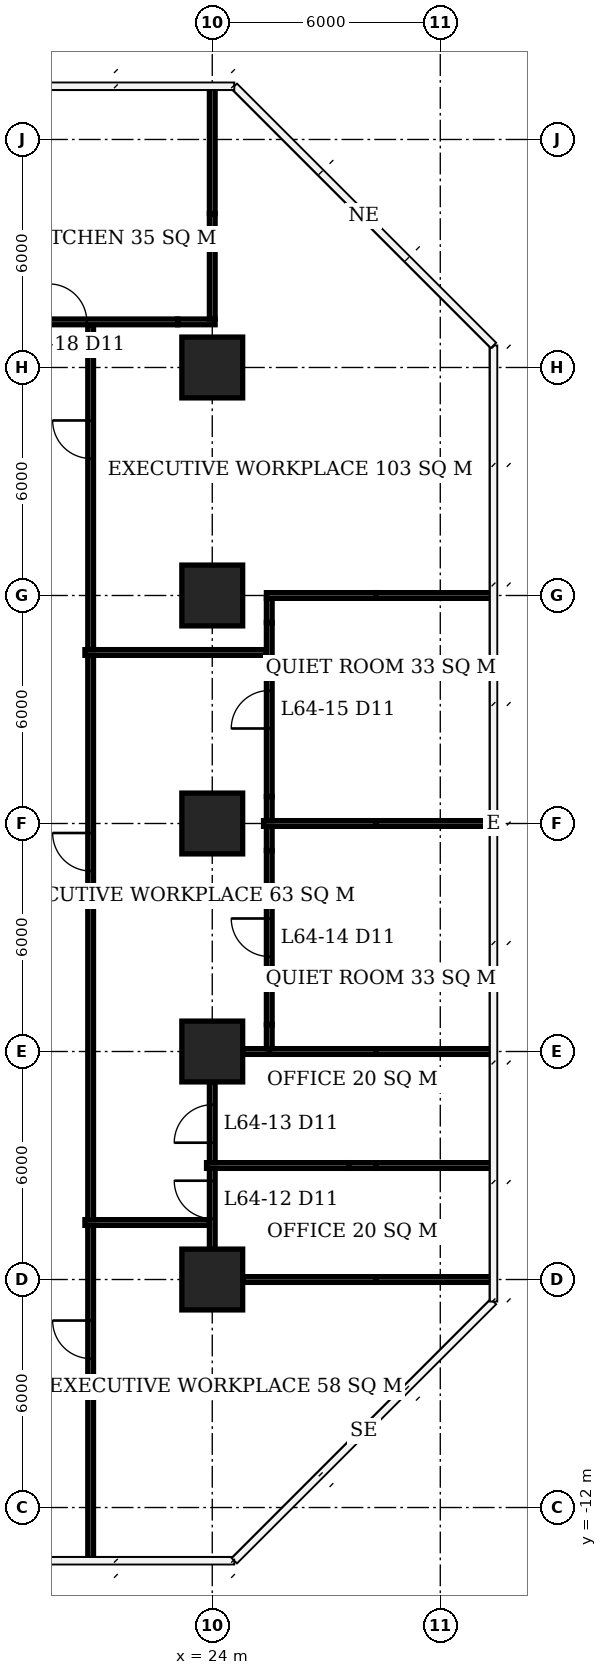
"""IFC4 building model, lengths in metres.
Left out: names, types, materials, properties, quantities, classifications, styles, units other than length and angle.
Written with IfcOpenShell. Run it as: python <this file> out.ifc"""

import sys

from ifc_helpers import new_model, si_unit, direction, frame, frame_2d, origin, origin_2d, place, context, subcontext, project, spatial, rectangle, extrude, element, fill, save


model = new_model("IFC4")
c1 = context("Model", 3, precision=1e-05, world=origin(), true_north=direction((0.0, 1.0)))
c2 = subcontext(c1, "Body", "Model", "MODEL_VIEW")
j1 = project(units=[si_unit("LENGTHUNIT", "METRE"), si_unit("PLANEANGLEUNIT", "RADIAN")], contexts=[c1])
p1 = place(None, origin())
s1 = spatial("IfcSite", under=j1, at=p1, CompositionType="ELEMENT")
p2 = place(p1, origin())
s2 = spatial("IfcBuilding", under=s1, at=p2, CompositionType="ELEMENT")
p3 = place(p2, frame((0.0, 0.0, 260.6)))
s3 = spatial("IfcBuildingStorey", under=s2, at=p3, CompositionType="ELEMENT", Elevation=260.6)
for number, where, z_axis, x_axis in (
    (1, (24.0, -6.0, 0.0), (0.0, 0.0, 1.0), (1.0, 0.0, 0.0)),
    (2, (24.0, 0.0, 0.0), (0.0, 0.0, 1.0), (1.0, 0.0, 0.0)),
    (3, (24.0, 6.0, 0.0), (0.0, 0.0, 1.0), (1.0, 0.0, 0.0)),
    (4, (24.0, 12.0, 0.0), (0.0, 0.0, 1.0), (1.0, 0.0, 0.0)),
    (5, (24.0, 18.0, 0.0), (0.0, 0.0, 1.0), (1.0, 0.0, 0.0)),
):
    element("IfcColumn", number, at=place(p3, frame(where, z_axis=z_axis, x_axis=x_axis)), inside=s3, PredefinedType="COLUMN", context=c2, shape_type="SweptSolid", body=[
        extrude(rectangle(XDim=1.6, YDim=1.6, at=origin_2d()), origin(), (0.0, 0.0, 1.0), 3.9),
    ])
p4 = place(p3, frame((24.8, -6.0, 0.0), z_axis=(0.0, 0.0, 1.0), x_axis=(1.0, 0.0, 0.0)))
e6 = element("IfcWall", 6, at=p4, inside=s3, PredefinedType="PARTITIONING", context=c2, shape_type="SweptSolid", body=[
    extrude(rectangle(XDim=3.51, YDim=0.15, at=frame_2d((1.755, 0.0))), origin(), (0.0, 0.0, 1.0), 2.65),
])
p5 = place(p3, frame((28.31, -6.0, 0.0), z_axis=(0.0, 0.0, 1.0), x_axis=(1.0, 0.0, 0.0)))
e7 = element("IfcWall", 7, at=p5, inside=s3, PredefinedType="PARTITIONING", context=c2, shape_type="SweptSolid", body=[
    extrude(rectangle(XDim=3.065, YDim=0.15, at=frame_2d((1.532, 0.0))), origin(), (0.0, 0.0, 1.0), 3.65),
])
p6 = place(p3, frame((23.85, -3.0, 0.0), z_axis=(0.0, 0.0, 1.0), x_axis=(1.0, 0.0, 0.0)))
e8 = element("IfcWall", 8, at=p6, inside=s3, PredefinedType="PARTITIONING", context=c2, shape_type="SweptSolid", body=[
    extrude(rectangle(XDim=3.74, YDim=0.15, at=frame_2d((1.87, 0.0))), origin(), (0.0, 0.0, 1.0), 3.65),
])
p7 = place(p3, frame((27.59, -3.0, 0.0), z_axis=(0.0, 0.0, 1.0), x_axis=(1.0, 0.0, 0.0)))
e9 = element("IfcWall", 9, at=p7, inside=s3, PredefinedType="PARTITIONING", context=c2, shape_type="SweptSolid", body=[
    extrude(rectangle(XDim=0.72, YDim=0.15, at=frame_2d((0.36, 0.0))), origin(), (0.0, 0.0, 1.0), 2.65),
])
p8 = place(p3, frame((28.31, -3.0, 0.0), z_axis=(0.0, 0.0, 1.0), x_axis=(1.0, 0.0, 0.0)))
e10 = element("IfcWall", 10, at=p8, inside=s3, PredefinedType="PARTITIONING", context=c2, shape_type="SweptSolid", body=[
    extrude(rectangle(XDim=3.065, YDim=0.15, at=frame_2d((1.532, 0.0))), origin(), (0.0, 0.0, 1.0), 3.65),
])
p9 = place(p3, frame((24.8, 0.0, 0.0), z_axis=(0.0, 0.0, 1.0), x_axis=(1.0, 0.0, 0.0)))
e11 = element("IfcWall", 11, at=p9, inside=s3, PredefinedType="PARTITIONING", context=c2, shape_type="SweptSolid", body=[
    extrude(rectangle(XDim=0.775, YDim=0.15, at=frame_2d((0.387, 0.0))), origin(), (0.0, 0.0, 1.0), 2.65),
])
p10 = place(p3, frame((25.5, 0.0, 0.0), z_axis=(0.0, 0.0, 1.0), x_axis=(1.0, 0.0, 0.0)))
e12 = element("IfcWall", 12, at=p10, inside=s3, PredefinedType="PARTITIONING", context=c2, shape_type="SweptSolid", body=[
    extrude(rectangle(XDim=2.81, YDim=0.15, at=frame_2d((1.405, 0.0))), origin(), (0.0, 0.0, 1.0), 2.65),
])
p11 = place(p3, frame((28.31, 0.0, 0.0), z_axis=(0.0, 0.0, 1.0), x_axis=(1.0, 0.0, 0.0)))
e13 = element("IfcWall", 13, at=p11, inside=s3, PredefinedType="PARTITIONING", context=c2, shape_type="SweptSolid", body=[
    extrude(rectangle(XDim=3.065, YDim=0.15, at=frame_2d((1.532, 0.0))), origin(), (0.0, 0.0, 1.0), 3.65),
])
p12 = place(p3, frame((25.35, 6.0, 0.0), z_axis=(0.0, 0.0, 1.0), x_axis=(1.0, 0.0, 0.0)))
e14 = element("IfcWall", 14, at=p12, inside=s3, PredefinedType="PARTITIONING", context=c2, shape_type="SweptSolid", body=[
    extrude(rectangle(XDim=2.96, YDim=0.15, at=frame_2d((1.48, 0.0))), origin(), (0.0, 0.0, 1.0), 2.65),
])
p13 = place(p3, frame((28.31, 6.0, 0.0), z_axis=(0.0, 0.0, 1.0), x_axis=(1.0, 0.0, 0.0)))
e15 = element("IfcWall", 15, at=p13, inside=s3, PredefinedType="PARTITIONING", context=c2, shape_type="SweptSolid", body=[
    extrude(rectangle(XDim=3.04, YDim=0.15, at=frame_2d((1.52, 0.0))), origin(), (0.0, 0.0, 1.0), 3.65),
])
p14 = place(p3, frame((25.425, 12.0, 0.0), z_axis=(0.0, 0.0, 1.0), x_axis=(1.0, 0.0, 0.0)))
e16 = element("IfcWall", 16, at=p14, inside=s3, PredefinedType="PARTITIONING", context=c2, shape_type="SweptSolid", body=[
    extrude(rectangle(XDim=2.885, YDim=0.15, at=frame_2d((1.442, 0.0))), origin(), (0.0, 0.0, 1.0), 2.65),
])
p15 = place(p3, frame((28.31, 12.0, 0.0), z_axis=(0.0, 0.0, 1.0), x_axis=(1.0, 0.0, 0.0)))
e17 = element("IfcWall", 17, at=p15, inside=s3, PredefinedType="PARTITIONING", context=c2, shape_type="SweptSolid", body=[
    extrude(rectangle(XDim=3.065, YDim=0.15, at=frame_2d((1.532, 0.0))), origin(), (0.0, 0.0, 1.0), 3.65),
])
p16 = place(p3, frame((18.075, 19.2, 0.0), z_axis=(0.0, 0.0, 1.0), x_axis=(1.0, 0.0, 0.0)))
e18 = element("IfcWall", 18, at=p16, inside=s3, PredefinedType="PARTITIONING", context=c2, shape_type="SweptSolid", body=[
    extrude(rectangle(XDim=5.015, YDim=0.15, at=frame_2d((2.508, 0.0))), origin(), (0.0, 0.0, 1.0), 3.65),
])
p17 = place(p16, frame((1.625, 0.0, 0.0)))
e19 = element("IfcOpeningElement", 19, at=p17, cuts=e18, PredefinedType="OPENING", context=c2, shape_type="SweptSolid", body=[
    extrude(rectangle(XDim=1.0, YDim=2.4, at=frame_2d((0.5, 1.2))), frame((0.0, 0.085, 0.0), z_axis=(0.0, -1.0, 0.0), x_axis=(1.0, 0.0, 0.0)), (0.0, 0.0, 1.0), 0.17),
])
p18 = place(p3, frame((23.09, 19.2, 0.0), z_axis=(0.0, 0.0, 1.0), x_axis=(1.0, 0.0, 0.0)))
e20 = element("IfcWall", 20, at=p18, inside=s3, PredefinedType="PARTITIONING", context=c2, shape_type="SweptSolid", body=[
    extrude(rectangle(XDim=0.985, YDim=0.15, at=frame_2d((0.492, 0.0))), origin(), (0.0, 0.0, 1.0), 2.65),
])
p19 = place(p3, frame((24.0, -5.2, 0.0), z_axis=(0.0, 0.0, 1.0), x_axis=(0.0, 1.0, 0.0)))
e21 = element("IfcWall", 21, at=p19, inside=s3, PredefinedType="PARTITIONING", context=c2, shape_type="SweptSolid", body=[
    extrude(rectangle(XDim=2.125, YDim=0.15, at=frame_2d((1.062, 0.0))), origin(), (0.0, 0.0, 1.0), 3.65),
])
p20 = place(p19, frame((0.8, 0.0, 0.0)))
e22 = element("IfcOpeningElement", 22, at=p20, cuts=e21, PredefinedType="OPENING", context=c2, shape_type="SweptSolid", body=[
    extrude(rectangle(XDim=1.0, YDim=2.4, at=frame_2d((0.5, 1.2))), frame((0.0, 0.085, 0.0), z_axis=(0.0, -1.0, 0.0), x_axis=(1.0, 0.0, 0.0)), (0.0, 0.0, 1.0), 0.17),
])
p21 = place(p3, frame((24.0, -2.925, 0.0), z_axis=(0.0, 0.0, 1.0), x_axis=(0.0, 1.0, 0.0)))
e23 = element("IfcWall", 23, at=p21, inside=s3, PredefinedType="PARTITIONING", context=c2, shape_type="SweptSolid", body=[
    extrude(rectangle(XDim=2.125, YDim=0.15, at=frame_2d((1.062, 0.0))), origin(), (0.0, 0.0, 1.0), 3.65),
])
p22 = place(p21, frame((0.525, 0.0, 0.0)))
e24 = element("IfcOpeningElement", 24, at=p22, cuts=e23, PredefinedType="OPENING", context=c2, shape_type="SweptSolid", body=[
    extrude(rectangle(XDim=1.0, YDim=2.4, at=frame_2d((0.5, 1.2))), frame((0.0, 0.085, 0.0), z_axis=(0.0, -1.0, 0.0), x_axis=(1.0, 0.0, 0.0)), (0.0, 0.0, 1.0), 0.17),
])
p23 = place(p3, frame((24.0, 19.275, 0.0), z_axis=(0.0, 0.0, 1.0), x_axis=(0.0, 1.0, 0.0)))
e25 = element("IfcWall", 25, at=p23, inside=s3, PredefinedType="PARTITIONING", context=c2, shape_type="SweptSolid", body=[
    extrude(rectangle(XDim=2.77, YDim=0.15, at=frame_2d((1.385, 0.0))), origin(), (0.0, 0.0, 1.0), 2.65),
])
p24 = place(p3, frame((24.0, 22.045, 0.0), z_axis=(0.0, 0.0, 1.0), x_axis=(0.0, 1.0, 0.0)))
e26 = element("IfcWall", 26, at=p24, inside=s3, PredefinedType="PARTITIONING", context=c2, shape_type="SweptSolid", body=[
    extrude(rectangle(XDim=3.33, YDim=0.15, at=frame_2d((1.665, 0.0))), origin(), (0.0, 0.0, 1.0), 3.65),
])
p25 = place(p3, frame((25.5, 0.075, 0.0), z_axis=(0.0, 0.0, 1.0), x_axis=(0.0, 1.0, 0.0)))
e27 = element("IfcWall", 27, at=p25, inside=s3, PredefinedType="PARTITIONING", context=c2, shape_type="SweptSolid", body=[
    extrude(rectangle(XDim=0.635, YDim=0.15, at=frame_2d((0.317, 0.0))), origin(), (0.0, 0.0, 1.0), 2.65),
])
p26 = place(p3, frame((25.5, 0.71, 0.0), z_axis=(0.0, 0.0, 1.0), x_axis=(0.0, 1.0, 0.0)))
e28 = element("IfcWall", 28, at=p26, inside=s3, PredefinedType="PARTITIONING", context=c2, shape_type="SweptSolid", body=[
    extrude(rectangle(XDim=4.58, YDim=0.15, at=frame_2d((2.29, 0.0))), origin(), (0.0, 0.0, 1.0), 3.65),
])
p27 = place(p26, frame((1.79, 0.0, 0.0)))
e29 = element("IfcOpeningElement", 29, at=p27, cuts=e28, PredefinedType="OPENING", context=c2, shape_type="SweptSolid", body=[
    extrude(rectangle(XDim=1.0, YDim=2.4, at=frame_2d((0.5, 1.2))), frame((0.0, 0.085, 0.0), z_axis=(0.0, -1.0, 0.0), x_axis=(1.0, 0.0, 0.0)), (0.0, 0.0, 1.0), 0.17),
])
for number, where, z_axis, x_axis in (
    (30, (25.5, 5.29, 0.0), (0.0, 0.0, 1.0), (0.0, 1.0, 0.0)),
    (31, (25.5, 6.075, 0.0), (0.0, 0.0, 1.0), (0.0, 1.0, 0.0)),
):
    element("IfcWall", number, at=place(p3, frame(where, z_axis=z_axis, x_axis=x_axis)), inside=s3, PredefinedType="PARTITIONING", context=c2, shape_type="SweptSolid", body=[
        extrude(rectangle(XDim=0.635, YDim=0.15, at=frame_2d((0.317, 0.0))), origin(), (0.0, 0.0, 1.0), 2.65),
    ])
p28 = place(p3, frame((25.5, 6.71, 0.0), z_axis=(0.0, 0.0, 1.0), x_axis=(0.0, 1.0, 0.0)))
e32 = element("IfcWall", 32, at=p28, inside=s3, PredefinedType="PARTITIONING", context=c2, shape_type="SweptSolid", body=[
    extrude(rectangle(XDim=4.58, YDim=0.15, at=frame_2d((2.29, 0.0))), origin(), (0.0, 0.0, 1.0), 3.65),
])
p29 = place(p28, frame((1.79, 0.0, 0.0)))
e33 = element("IfcOpeningElement", 33, at=p29, cuts=e32, PredefinedType="OPENING", context=c2, shape_type="SweptSolid", body=[
    extrude(rectangle(XDim=1.0, YDim=2.4, at=frame_2d((0.5, 1.2))), frame((0.0, 0.085, 0.0), z_axis=(0.0, -1.0, 0.0), x_axis=(1.0, 0.0, 0.0)), (0.0, 0.0, 1.0), 0.17),
])
p30 = place(p3, frame((25.5, 11.29, 0.0), z_axis=(0.0, 0.0, 1.0), x_axis=(0.0, 1.0, 0.0)))
e34 = element("IfcWall", 34, at=p30, inside=s3, PredefinedType="PARTITIONING", context=c2, shape_type="SweptSolid", body=[
    extrude(rectangle(XDim=0.635, YDim=0.15, at=frame_2d((0.317, 0.0))), origin(), (0.0, 0.0, 1.0), 2.65),
])
p31 = place(p3, frame((20.8, -13.375, 0.0), z_axis=(0.0, 0.0, 1.0), x_axis=(0.0, 1.0, 0.0)))
e35 = element("IfcWall", 35, at=p31, inside=s3, PredefinedType="PARTITIONING", context=c2, shape_type="SweptSolid", body=[
    extrude(rectangle(XDim=8.8, YDim=0.15, at=frame_2d((4.4, 0.0))), origin(), (0.0, 0.0, 1.0), 3.65),
])
p32 = place(p31, frame((5.295, 0.0, 0.0)))
e36 = element("IfcOpeningElement", 36, at=p32, cuts=e35, PredefinedType="OPENING", context=c2, shape_type="SweptSolid", body=[
    extrude(rectangle(XDim=1.0, YDim=2.4, at=frame_2d((0.5, 1.2))), frame((0.0, 0.085, 0.0), z_axis=(0.0, -1.0, 0.0), x_axis=(1.0, 0.0, 0.0)), (0.0, 0.0, 1.0), 0.17),
])
p33 = place(p3, frame((20.8, -4.425, 0.0), z_axis=(0.0, 0.0, 1.0), x_axis=(0.0, 1.0, 0.0)))
e37 = element("IfcWall", 37, at=p33, inside=s3, PredefinedType="PARTITIONING", context=c2, shape_type="SweptSolid", body=[
    extrude(rectangle(XDim=14.85, YDim=0.15, at=frame_2d((7.425, 0.0))), origin(), (0.0, 0.0, 1.0), 3.65),
])
p34 = place(p33, frame((9.175, 0.0, 0.0)))
e38 = element("IfcOpeningElement", 38, at=p34, cuts=e37, PredefinedType="OPENING", context=c2, shape_type="SweptSolid", body=[
    extrude(rectangle(XDim=1.0, YDim=2.4, at=frame_2d((0.5, 1.2))), frame((0.0, 0.085, 0.0), z_axis=(0.0, -1.0, 0.0), x_axis=(1.0, 0.0, 0.0)), (0.0, 0.0, 1.0), 0.17),
])
p35 = place(p3, frame((20.65, -4.5, 0.0), z_axis=(0.0, 0.0, 1.0), x_axis=(1.0, 0.0, 0.0)))
e39 = element("IfcWall", 39, at=p35, inside=s3, PredefinedType="PARTITIONING", context=c2, shape_type="SweptSolid", body=[
    extrude(rectangle(XDim=3.275, YDim=0.15, at=frame_2d((1.638, 0.0))), origin(), (0.0, 0.0, 1.0), 3.65),
])
p36 = place(p3, frame((20.8, 10.575, 0.0), z_axis=(0.0, 0.0, 1.0), x_axis=(0.0, 1.0, 0.0)))
e40 = element("IfcWall", 40, at=p36, inside=s3, PredefinedType="PARTITIONING", context=c2, shape_type="SweptSolid", body=[
    extrude(rectangle(XDim=8.55, YDim=0.15, at=frame_2d((4.275, 0.0))), origin(), (0.0, 0.0, 1.0), 3.65),
])
p37 = place(p36, frame((5.031, 0.0, 0.0)))
e41 = element("IfcOpeningElement", 41, at=p37, cuts=e40, PredefinedType="OPENING", context=c2, shape_type="SweptSolid", body=[
    extrude(rectangle(XDim=1.0, YDim=2.4, at=frame_2d((0.5, 1.2))), frame((0.0, 0.085, 0.0), z_axis=(0.0, -1.0, 0.0), x_axis=(1.0, 0.0, 0.0)), (0.0, 0.0, 1.0), 0.17),
])
p38 = place(p3, frame((20.65, 10.5, 0.0), z_axis=(0.0, 0.0, 1.0), x_axis=(1.0, 0.0, 0.0)))
e42 = element("IfcWall", 42, at=p38, inside=s3, PredefinedType="PARTITIONING", context=c2, shape_type="SweptSolid", body=[
    extrude(rectangle(XDim=4.775, YDim=0.15, at=frame_2d((2.388, 0.0))), origin(), (0.0, 0.0, 1.0), 3.65),
])
p39 = place(p20, origin())
e43 = element("IfcDoor", 43, at=p39, inside=s3, OperationType="SINGLE_SWING_RIGHT", PredefinedType="DOOR", context=c2, shape_type="SweptSolid", body=[
    extrude(rectangle(XDim=1.0, YDim=2.4, at=frame_2d((0.5, 1.2))), frame((0.0, 0.025, 0.0), z_axis=(0.0, -1.0, 0.0), x_axis=(1.0, 0.0, 0.0)), (0.0, 0.0, 1.0), 0.05),
])
fill(e22, e43)
p40 = place(p22, origin())
e44 = element("IfcDoor", 44, at=p40, inside=s3, OperationType="SINGLE_SWING_LEFT", PredefinedType="DOOR", context=c2, shape_type="SweptSolid", body=[
    extrude(rectangle(XDim=1.0, YDim=2.4, at=frame_2d((0.5, 1.2))), frame((0.0, 0.025, 0.0), z_axis=(0.0, -1.0, 0.0), x_axis=(1.0, 0.0, 0.0)), (0.0, 0.0, 1.0), 0.05),
])
fill(e24, e44)
p41 = place(p27, origin())
e45 = element("IfcDoor", 45, at=p41, inside=s3, OperationType="SINGLE_SWING_RIGHT", PredefinedType="DOOR", context=c2, shape_type="SweptSolid", body=[
    extrude(rectangle(XDim=1.0, YDim=2.4, at=frame_2d((0.5, 1.2))), frame((0.0, 0.025, 0.0), z_axis=(0.0, -1.0, 0.0), x_axis=(1.0, 0.0, 0.0)), (0.0, 0.0, 1.0), 0.05),
])
fill(e29, e45)
p42 = place(p29, origin())
e46 = element("IfcDoor", 46, at=p42, inside=s3, OperationType="SINGLE_SWING_LEFT", PredefinedType="DOOR", context=c2, shape_type="SweptSolid", body=[
    extrude(rectangle(XDim=1.0, YDim=2.4, at=frame_2d((0.5, 1.2))), frame((0.0, 0.025, 0.0), z_axis=(0.0, -1.0, 0.0), x_axis=(1.0, 0.0, 0.0)), (0.0, 0.0, 1.0), 0.05),
])
fill(e33, e46)
p43 = place(p17, origin())
e47 = element("IfcDoor", 47, at=p43, inside=s3, OperationType="SINGLE_SWING_LEFT", PredefinedType="DOOR", context=c2, shape_type="SweptSolid", body=[
    extrude(rectangle(XDim=1.0, YDim=2.4, at=frame_2d((0.5, 1.2))), frame((0.0, 0.025, 0.0), z_axis=(0.0, -1.0, 0.0), x_axis=(1.0, 0.0, 0.0)), (0.0, 0.0, 1.0), 0.05),
])
fill(e19, e47)
p44 = place(p32, origin())
e48 = element("IfcDoor", 48, at=p44, inside=s3, OperationType="SINGLE_SWING_RIGHT", PredefinedType="DOOR", context=c2, shape_type="SweptSolid", body=[
    extrude(rectangle(XDim=1.0, YDim=2.4, at=frame_2d((0.5, 1.2))), frame((0.0, 0.025, 0.0), z_axis=(0.0, -1.0, 0.0), x_axis=(1.0, 0.0, 0.0)), (0.0, 0.0, 1.0), 0.05),
])
fill(e36, e48)
p45 = place(p34, origin())
e49 = element("IfcDoor", 49, at=p45, inside=s3, OperationType="SINGLE_SWING_RIGHT", PredefinedType="DOOR", context=c2, shape_type="SweptSolid", body=[
    extrude(rectangle(XDim=1.0, YDim=2.4, at=frame_2d((0.5, 1.2))), frame((0.0, 0.025, 0.0), z_axis=(0.0, -1.0, 0.0), x_axis=(1.0, 0.0, 0.0)), (0.0, 0.0, 1.0), 0.05),
])
fill(e38, e49)
p46 = place(p37, origin())
e50 = element("IfcDoor", 50, at=p46, inside=s3, OperationType="SINGLE_SWING_RIGHT", PredefinedType="DOOR", context=c2, shape_type="SweptSolid", body=[
    extrude(rectangle(XDim=1.0, YDim=2.4, at=frame_2d((0.5, 1.2))), frame((0.0, 0.025, 0.0), z_axis=(0.0, -1.0, 0.0), x_axis=(1.0, 0.0, 0.0)), (0.0, 0.0, 1.0), 0.05),
])
fill(e41, e50)
save(model, sys.argv[1])
